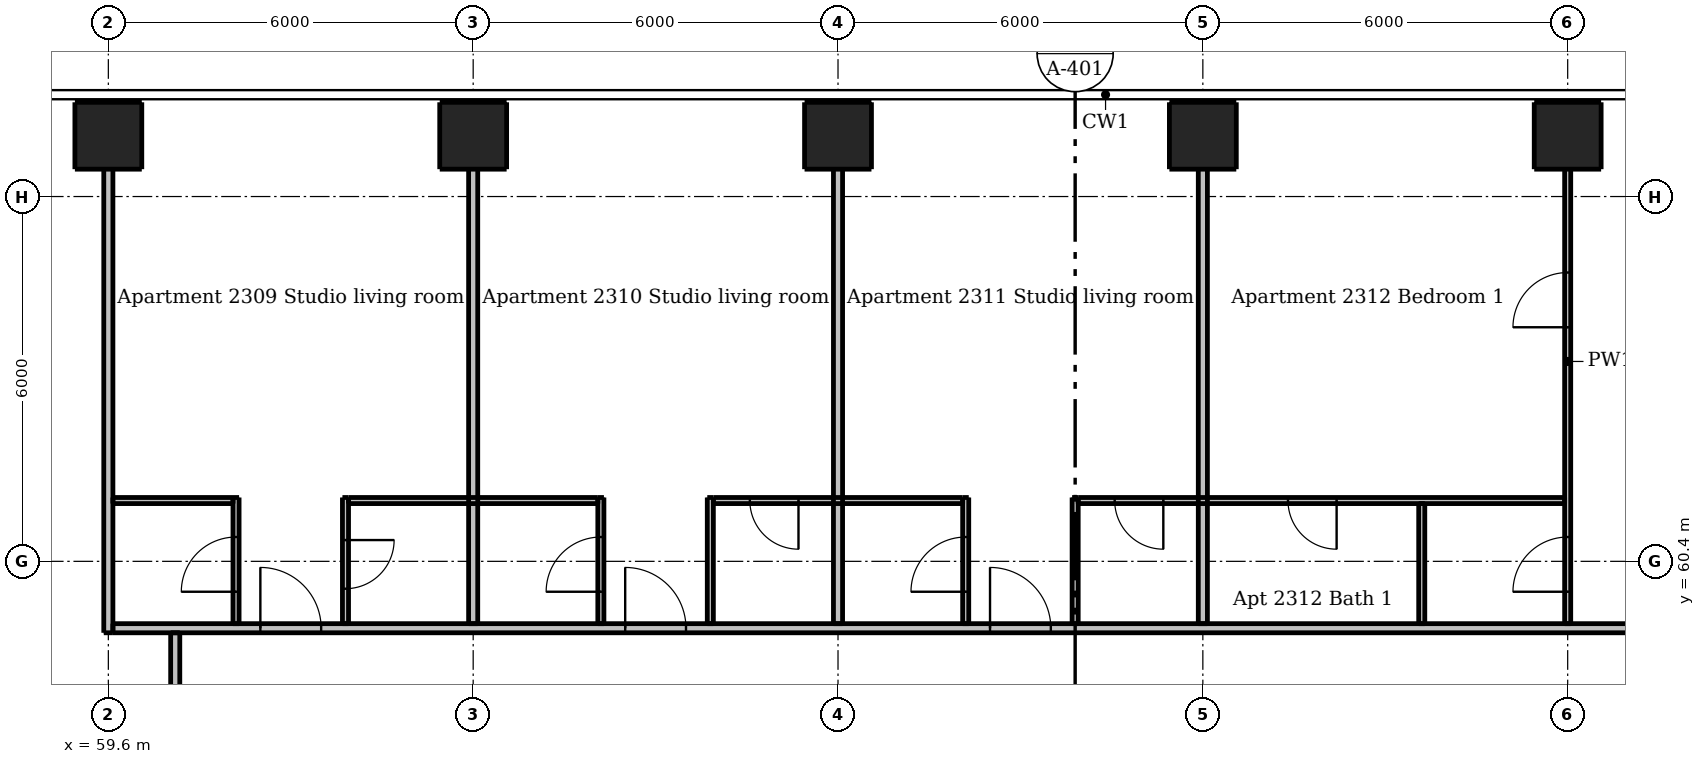
"""IFC4 building model, lengths in metres.
Left out: names, types, materials, properties, quantities, classifications, styles, units other than length and angle.
Written with IfcOpenShell. Run it as: python <this file> out.ifc"""

import sys

from ifc_helpers import new_model, si_unit, direction, frame, frame_2d, origin, origin_2d, place, context, subcontext, project, spatial, rectangle, extrude, element, fill, save


model = new_model("IFC4")
c1 = context("Model", 3, precision=1e-05, world=origin(), true_north=direction((0.0, 1.0)))
c2 = subcontext(c1, "Body", "Model", "MODEL_VIEW")
j1 = project(units=[si_unit("LENGTHUNIT", "METRE"), si_unit("PLANEANGLEUNIT", "RADIAN")], contexts=[c1])
p1 = place(None, origin())
s1 = spatial("IfcSite", under=j1, at=p1, CompositionType="ELEMENT")
p2 = place(p1, origin())
s2 = spatial("IfcBuilding", under=s1, at=p2, CompositionType="ELEMENT")
p3 = place(p2, frame((0.0, 0.0, 88.6)))
s3 = spatial("IfcBuildingStorey", under=s2, at=p3, CompositionType="ELEMENT", Elevation=88.6)
for number, where, z_axis, x_axis in (
    (1, (59.6, 67.4, 0.0), (0.0, 0.0, 1.0), (1.0, 0.0, 0.0)),
    (2, (65.6, 67.4, 0.0), (0.0, 0.0, 1.0), (1.0, 0.0, 0.0)),
    (3, (71.6, 67.4, 0.0), (0.0, 0.0, 1.0), (1.0, 0.0, 0.0)),
    (4, (77.6, 67.4, 0.0), (0.0, 0.0, 1.0), (1.0, 0.0, 0.0)),
    (5, (83.6, 67.4, 0.0), (0.0, 0.0, 1.0), (1.0, 0.0, 0.0)),
):
    element("IfcColumn", number, at=place(p3, frame(where, z_axis=z_axis, x_axis=x_axis)), inside=s3, PredefinedType="COLUMN", context=c2, shape_type="SweptSolid", body=[
        extrude(rectangle(XDim=1.1, YDim=1.1, at=origin_2d()), origin(), (0.0, 0.0, 1.0), 3.05),
    ])
p4 = place(p3, frame((61.7, 59.375, 0.0), z_axis=(0.0, 0.0, 1.0), x_axis=(0.0, 1.0, 0.0)))
e6 = element("IfcWall", 6, at=p4, inside=s3, PredefinedType="PARTITIONING", context=c2, shape_type="SweptSolid", body=[
    extrude(rectangle(XDim=2.075, YDim=0.1, at=frame_2d((1.038, 0.0))), origin(), (0.0, 0.0, 1.0), 3.05),
])
p5 = place(p4, frame((0.525, 0.0, 0.0)))
e7 = element("IfcOpeningElement", 7, at=p5, cuts=e6, PredefinedType="OPENING", context=c2, shape_type="SweptSolid", body=[
    extrude(rectangle(XDim=0.9, YDim=2.1, at=frame_2d((0.45, 1.05))), frame((0.0, 0.06, 0.0), z_axis=(0.0, -1.0, 0.0), x_axis=(1.0, 0.0, 0.0)), (0.0, 0.0, 1.0), 0.12),
])
p6 = place(p3, frame((63.5, 61.45, 0.0), z_axis=(0.0, 0.0, 1.0), x_axis=(0.0, -1.0, 0.0)))
e8 = element("IfcWall", 8, at=p6, inside=s3, PredefinedType="PARTITIONING", context=c2, shape_type="SweptSolid", body=[
    extrude(rectangle(XDim=2.075, YDim=0.1, at=frame_2d((1.038, 0.0))), origin(), (0.0, 0.0, 1.0), 3.05),
])
p7 = place(p6, frame((0.7, 0.0, 0.0)))
e9 = element("IfcOpeningElement", 9, at=p7, cuts=e8, PredefinedType="OPENING", context=c2, shape_type="SweptSolid", body=[
    extrude(rectangle(XDim=0.8, YDim=2.1, at=frame_2d((0.4, 1.05))), frame((0.0, 0.06, 0.0), z_axis=(0.0, -1.0, 0.0), x_axis=(1.0, 0.0, 0.0)), (0.0, 0.0, 1.0), 0.12),
])
p8 = place(p3, frame((67.7, 59.375, 0.0), z_axis=(0.0, 0.0, 1.0), x_axis=(0.0, 1.0, 0.0)))
e10 = element("IfcWall", 10, at=p8, inside=s3, PredefinedType="PARTITIONING", context=c2, shape_type="SweptSolid", body=[
    extrude(rectangle(XDim=2.075, YDim=0.1, at=frame_2d((1.038, 0.0))), origin(), (0.0, 0.0, 1.0), 3.05),
])
p9 = place(p8, frame((0.525, 0.0, 0.0)))
e11 = element("IfcOpeningElement", 11, at=p9, cuts=e10, PredefinedType="OPENING", context=c2, shape_type="SweptSolid", body=[
    extrude(rectangle(XDim=0.9, YDim=2.1, at=frame_2d((0.45, 1.05))), frame((0.0, 0.06, 0.0), z_axis=(0.0, -1.0, 0.0), x_axis=(1.0, 0.0, 0.0)), (0.0, 0.0, 1.0), 0.12),
])
p10 = place(p3, frame((69.5, 59.375, 0.0), z_axis=(0.0, 0.0, 1.0), x_axis=(0.0, 1.0, 0.0)))
e12 = element("IfcWall", 12, at=p10, inside=s3, PredefinedType="PARTITIONING", context=c2, shape_type="SweptSolid", body=[
    extrude(rectangle(XDim=2.075, YDim=0.1, at=frame_2d((1.038, 0.0))), origin(), (0.0, 0.0, 1.0), 3.05),
])
p11 = place(p3, frame((73.7, 59.375, 0.0), z_axis=(0.0, 0.0, 1.0), x_axis=(0.0, 1.0, 0.0)))
e13 = element("IfcWall", 13, at=p11, inside=s3, PredefinedType="PARTITIONING", context=c2, shape_type="SweptSolid", body=[
    extrude(rectangle(XDim=2.075, YDim=0.1, at=frame_2d((1.038, 0.0))), origin(), (0.0, 0.0, 1.0), 3.05),
])
p12 = place(p11, frame((0.525, 0.0, 0.0)))
e14 = element("IfcOpeningElement", 14, at=p12, cuts=e13, PredefinedType="OPENING", context=c2, shape_type="SweptSolid", body=[
    extrude(rectangle(XDim=0.9, YDim=2.1, at=frame_2d((0.45, 1.05))), frame((0.0, 0.06, 0.0), z_axis=(0.0, -1.0, 0.0), x_axis=(1.0, 0.0, 0.0)), (0.0, 0.0, 1.0), 0.12),
])
p13 = place(p3, frame((75.5, 59.375, 0.0), z_axis=(0.0, 0.0, 1.0), x_axis=(0.0, 1.0, 0.0)))
e15 = element("IfcWall", 15, at=p13, inside=s3, PredefinedType="PARTITIONING", context=c2, shape_type="SweptSolid", body=[
    extrude(rectangle(XDim=2.075, YDim=0.1, at=frame_2d((1.038, 0.0))), origin(), (0.0, 0.0, 1.0), 3.05),
])
p14 = place(p3, frame((81.2, 59.375, 0.0), z_axis=(0.0, 0.0, 1.0), x_axis=(0.0, 1.0, 0.0)))
e16 = element("IfcWall", 16, at=p14, inside=s3, PredefinedType="PARTITIONING", context=c2, shape_type="SweptSolid", body=[
    extrude(rectangle(XDim=1.975, YDim=0.1, at=frame_2d((0.988, 0.0))), origin(), (0.0, 0.0, 1.0), 3.05),
])
p15 = place(p3, frame((83.6, 59.375, 0.0), z_axis=(0.0, 0.0, 1.0), x_axis=(0.0, 1.0, 0.0)))
e17 = element("IfcWall", 17, at=p15, inside=s3, PredefinedType="PARTITIONING", context=c2, shape_type="SweptSolid", body=[
    extrude(rectangle(XDim=8.625, YDim=0.1, at=frame_2d((4.312, 0.0))), origin(), (0.0, 0.0, 1.0), 2.516),
])
p16 = place(p15, frame((0.525, 0.0, 0.0)))
e18 = element("IfcOpeningElement", 18, at=p16, cuts=e17, PredefinedType="OPENING", context=c2, shape_type="SweptSolid", body=[
    extrude(rectangle(XDim=0.9, YDim=2.1, at=frame_2d((0.45, 1.05))), frame((0.0, 0.06, 0.0), z_axis=(0.0, -1.0, 0.0), x_axis=(1.0, 0.0, 0.0)), (0.0, 0.0, 1.0), 0.12),
])
p17 = place(p15, frame((4.875, 0.0, 0.0)))
e19 = element("IfcOpeningElement", 19, at=p17, cuts=e17, PredefinedType="OPENING", context=c2, shape_type="SweptSolid", body=[
    extrude(rectangle(XDim=0.9, YDim=2.1, at=frame_2d((0.45, 1.05))), frame((0.0, 0.06, 0.0), z_axis=(0.0, -1.0, 0.0), x_axis=(1.0, 0.0, 0.0)), (0.0, 0.0, 1.0), 0.12),
])
p18 = place(p3, frame((59.675, 61.4, 0.0), z_axis=(0.0, 0.0, 1.0), x_axis=(1.0, 0.0, 0.0)))
e20 = element("IfcWall", 20, at=p18, inside=s3, PredefinedType="PARTITIONING", context=c2, shape_type="SweptSolid", body=[
    extrude(rectangle(XDim=1.975, YDim=0.1, at=frame_2d((0.987, 0.0))), origin(), (0.0, 0.0, 1.0), 3.05),
])
p19 = place(p3, frame((63.55, 61.4, 0.0), z_axis=(0.0, 0.0, 1.0), x_axis=(1.0, 0.0, 0.0)))
e21 = element("IfcWall", 21, at=p19, inside=s3, PredefinedType="PARTITIONING", context=c2, shape_type="SweptSolid", body=[
    extrude(rectangle(XDim=4.1, YDim=0.1, at=frame_2d((2.05, 0.0))), origin(), (0.0, 0.0, 1.0), 3.05),
])
p20 = place(p3, frame((73.65, 61.4, 0.0), z_axis=(0.0, 0.0, 1.0), x_axis=(-1.0, 0.0, 0.0)))
e22 = element("IfcWall", 22, at=p20, inside=s3, PredefinedType="PARTITIONING", context=c2, shape_type="SweptSolid", body=[
    extrude(rectangle(XDim=4.1, YDim=0.1, at=frame_2d((2.05, 0.0))), origin(), (0.0, 0.0, 1.0), 3.05),
])
p21 = place(p20, frame((2.7, 0.0, 0.0)))
e23 = element("IfcOpeningElement", 23, at=p21, cuts=e22, PredefinedType="OPENING", context=c2, shape_type="SweptSolid", body=[
    extrude(rectangle(XDim=0.8, YDim=2.1, at=frame_2d((0.4, 1.05))), frame((0.0, 0.06, 0.0), z_axis=(0.0, -1.0, 0.0), x_axis=(1.0, 0.0, 0.0)), (0.0, 0.0, 1.0), 0.12),
])
p22 = place(p3, frame((83.55, 61.4, 0.0), z_axis=(0.0, 0.0, 1.0), x_axis=(-1.0, 0.0, 0.0)))
e24 = element("IfcWall", 24, at=p22, inside=s3, PredefinedType="PARTITIONING", context=c2, shape_type="SweptSolid", body=[
    extrude(rectangle(XDim=8.0, YDim=0.1, at=frame_2d((4.0, 0.0))), origin(), (0.0, 0.0, 1.0), 3.05),
])
p23 = place(p22, frame((6.6, 0.0, 0.0)))
e25 = element("IfcOpeningElement", 25, at=p23, cuts=e24, PredefinedType="OPENING", context=c2, shape_type="SweptSolid", body=[
    extrude(rectangle(XDim=0.8, YDim=2.1, at=frame_2d((0.4, 1.05))), frame((0.0, 0.06, 0.0), z_axis=(0.0, -1.0, 0.0), x_axis=(1.0, 0.0, 0.0)), (0.0, 0.0, 1.0), 0.12),
])
p24 = place(p22, frame((3.75, 0.0, 0.0)))
e26 = element("IfcOpeningElement", 26, at=p24, cuts=e24, PredefinedType="OPENING", context=c2, shape_type="SweptSolid", body=[
    extrude(rectangle(XDim=0.8, YDim=2.1, at=frame_2d((0.4, 1.05))), frame((0.0, 0.06, 0.0), z_axis=(0.0, -1.0, 0.0), x_axis=(1.0, 0.0, 0.0)), (0.0, 0.0, 1.0), 0.12),
])
p25 = place(p3, frame((59.6, 59.225, 0.0), z_axis=(0.0, 0.0, 1.0), x_axis=(0.0, 1.0, 0.0)))
e27 = element("IfcWall", 27, at=p25, inside=s3, PredefinedType="PARTITIONING", context=c2, shape_type="SweptSolid", body=[
    extrude(rectangle(XDim=8.775, YDim=0.15, at=frame_2d((4.387, 0.0))), origin(), (0.0, 0.0, 1.0), 2.51),
])
p26 = place(p3, frame((60.7, 30.325, 0.0), z_axis=(0.0, 0.0, 1.0), x_axis=(0.0, 1.0, 0.0)))
e28 = element("IfcWall", 28, at=p26, inside=s3, PredefinedType="PARTITIONING", context=c2, shape_type="SweptSolid", body=[
    extrude(rectangle(XDim=28.9, YDim=0.15, at=frame_2d((14.45, 0.0))), origin(), (0.0, 0.0, 1.0), 3.05),
])
p27 = place(p26, frame((2.575, 0.0, 0.0)))
e29 = element("IfcOpeningElement", 29, at=p27, cuts=e28, PredefinedType="OPENING", context=c2, shape_type="SweptSolid", body=[
    extrude(rectangle(XDim=1.0, YDim=2.1, at=frame_2d((0.5, 1.05))), frame((0.0, 0.085, 0.0), z_axis=(0.0, -1.0, 0.0), x_axis=(1.0, 0.0, 0.0)), (0.0, 0.0, 1.0), 0.17),
])
p28 = place(p26, frame((8.575, 0.0, 0.0)))
e30 = element("IfcOpeningElement", 30, at=p28, cuts=e28, PredefinedType="OPENING", context=c2, shape_type="SweptSolid", body=[
    extrude(rectangle(XDim=1.0, YDim=2.1, at=frame_2d((0.5, 1.05))), frame((0.0, 0.085, 0.0), z_axis=(0.0, -1.0, 0.0), x_axis=(1.0, 0.0, 0.0)), (0.0, 0.0, 1.0), 0.17),
])
p29 = place(p26, frame((14.575, 0.0, 0.0)))
e31 = element("IfcOpeningElement", 31, at=p29, cuts=e28, PredefinedType="OPENING", context=c2, shape_type="SweptSolid", body=[
    extrude(rectangle(XDim=1.0, YDim=2.1, at=frame_2d((0.5, 1.05))), frame((0.0, 0.085, 0.0), z_axis=(0.0, -1.0, 0.0), x_axis=(1.0, 0.0, 0.0)), (0.0, 0.0, 1.0), 0.17),
])
p30 = place(p26, frame((26.025, 0.0, 0.0)))
e32 = element("IfcOpeningElement", 32, at=p30, cuts=e28, PredefinedType="OPENING", context=c2, shape_type="SweptSolid", body=[
    extrude(rectangle(XDim=1.0, YDim=2.1, at=frame_2d((0.5, 1.05))), frame((0.0, 0.085, 0.0), z_axis=(0.0, -1.0, 0.0), x_axis=(1.0, 0.0, 0.0)), (0.0, 0.0, 1.0), 0.17),
])
for number, where, z_axis, x_axis in (
    (33, (65.6, 59.375, 0.0), (0.0, 0.0, 1.0), (0.0, 1.0, 0.0)),
    (34, (71.6, 59.375, 0.0), (0.0, 0.0, 1.0), (0.0, 1.0, 0.0)),
    (35, (77.6, 59.375, 0.0), (0.0, 0.0, 1.0), (0.0, 1.0, 0.0)),
):
    element("IfcWall", number, at=place(p3, frame(where, z_axis=z_axis, x_axis=x_axis)), inside=s3, PredefinedType="PARTITIONING", context=c2, shape_type="SweptSolid", body=[
        extrude(rectangle(XDim=8.625, YDim=0.15, at=frame_2d((4.312, 0.0))), origin(), (0.0, 0.0, 1.0), 2.516),
    ])
p31 = place(p3, frame((59.675, 59.3, 0.0), z_axis=(0.0, 0.0, 1.0), x_axis=(1.0, 0.0, 0.0)))
e36 = element("IfcWall", 36, at=p31, inside=s3, PredefinedType="PARTITIONING", context=c2, shape_type="SweptSolid", body=[
    extrude(rectangle(XDim=28.55, YDim=0.15, at=frame_2d((14.275, 0.0))), origin(), (0.0, 0.0, 1.0), 3.05),
])
p32 = place(p31, frame((2.425, 0.0, 0.0)))
e37 = element("IfcOpeningElement", 37, at=p32, cuts=e36, PredefinedType="OPENING", context=c2, shape_type="SweptSolid", body=[
    extrude(rectangle(XDim=1.0, YDim=2.1, at=frame_2d((0.5, 1.05))), frame((0.0, 0.085, 0.0), z_axis=(0.0, -1.0, 0.0), x_axis=(1.0, 0.0, 0.0)), (0.0, 0.0, 1.0), 0.17),
])
p33 = place(p31, frame((8.425, 0.0, 0.0)))
e38 = element("IfcOpeningElement", 38, at=p33, cuts=e36, PredefinedType="OPENING", context=c2, shape_type="SweptSolid", body=[
    extrude(rectangle(XDim=1.0, YDim=2.1, at=frame_2d((0.5, 1.05))), frame((0.0, 0.085, 0.0), z_axis=(0.0, -1.0, 0.0), x_axis=(1.0, 0.0, 0.0)), (0.0, 0.0, 1.0), 0.17),
])
p34 = place(p31, frame((14.425, 0.0, 0.0)))
e39 = element("IfcOpeningElement", 39, at=p34, cuts=e36, PredefinedType="OPENING", context=c2, shape_type="SweptSolid", body=[
    extrude(rectangle(XDim=1.0, YDim=2.1, at=frame_2d((0.5, 1.05))), frame((0.0, 0.085, 0.0), z_axis=(0.0, -1.0, 0.0), x_axis=(1.0, 0.0, 0.0)), (0.0, 0.0, 1.0), 0.17),
])
p35 = place(p31, frame((25.775, 0.0, 0.0)))
e40 = element("IfcOpeningElement", 40, at=p35, cuts=e36, PredefinedType="OPENING", context=c2, shape_type="SweptSolid", body=[
    extrude(rectangle(XDim=1.0, YDim=2.1, at=frame_2d((0.5, 1.05))), frame((0.0, 0.085, 0.0), z_axis=(0.0, -1.0, 0.0), x_axis=(1.0, 0.0, 0.0)), (0.0, 0.0, 1.0), 0.17),
])
p36 = place(p32, origin())
e41 = element("IfcDoor", 41, at=p36, inside=s3, OperationType="SINGLE_SWING_LEFT", PredefinedType="DOOR", context=c2, shape_type="SweptSolid", body=[
    extrude(rectangle(XDim=1.0, YDim=2.1, at=frame_2d((0.5, 1.05))), frame((0.0, 0.025, 0.0), z_axis=(0.0, -1.0, 0.0), x_axis=(1.0, 0.0, 0.0)), (0.0, 0.0, 1.0), 0.05),
])
fill(e37, e41)
p37 = place(p5, origin())
e42 = element("IfcDoor", 42, at=p37, inside=s3, OperationType="SINGLE_SWING_LEFT", PredefinedType="DOOR", context=c2, shape_type="SweptSolid", body=[
    extrude(rectangle(XDim=0.9, YDim=2.1, at=frame_2d((0.45, 1.05))), frame((0.0, 0.025, 0.0), z_axis=(0.0, -1.0, 0.0), x_axis=(1.0, 0.0, 0.0)), (0.0, 0.0, 1.0), 0.05),
])
fill(e7, e42)
p38 = place(p7, origin())
e43 = element("IfcDoor", 43, at=p38, inside=s3, OperationType="SINGLE_SWING_LEFT", PredefinedType="DOOR", context=c2, shape_type="SweptSolid", body=[
    extrude(rectangle(XDim=0.8, YDim=2.1, at=frame_2d((0.4, 1.05))), frame((0.0, 0.025, 0.0), z_axis=(0.0, -1.0, 0.0), x_axis=(1.0, 0.0, 0.0)), (0.0, 0.0, 1.0), 0.05),
])
fill(e9, e43)
p39 = place(p33, origin())
e44 = element("IfcDoor", 44, at=p39, inside=s3, OperationType="SINGLE_SWING_LEFT", PredefinedType="DOOR", context=c2, shape_type="SweptSolid", body=[
    extrude(rectangle(XDim=1.0, YDim=2.1, at=frame_2d((0.5, 1.05))), frame((0.0, 0.025, 0.0), z_axis=(0.0, -1.0, 0.0), x_axis=(1.0, 0.0, 0.0)), (0.0, 0.0, 1.0), 0.05),
])
fill(e38, e44)
p40 = place(p9, origin())
e45 = element("IfcDoor", 45, at=p40, inside=s3, OperationType="SINGLE_SWING_LEFT", PredefinedType="DOOR", context=c2, shape_type="SweptSolid", body=[
    extrude(rectangle(XDim=0.9, YDim=2.1, at=frame_2d((0.45, 1.05))), frame((0.0, 0.025, 0.0), z_axis=(0.0, -1.0, 0.0), x_axis=(1.0, 0.0, 0.0)), (0.0, 0.0, 1.0), 0.05),
])
fill(e11, e45)
p41 = place(p21, origin())
e46 = element("IfcDoor", 46, at=p41, inside=s3, OperationType="SINGLE_SWING_LEFT", PredefinedType="DOOR", context=c2, shape_type="SweptSolid", body=[
    extrude(rectangle(XDim=0.8, YDim=2.1, at=frame_2d((0.4, 1.05))), frame((0.0, 0.025, 0.0), z_axis=(0.0, -1.0, 0.0), x_axis=(1.0, 0.0, 0.0)), (0.0, 0.0, 1.0), 0.05),
])
fill(e23, e46)
p42 = place(p34, origin())
e47 = element("IfcDoor", 47, at=p42, inside=s3, OperationType="SINGLE_SWING_LEFT", PredefinedType="DOOR", context=c2, shape_type="SweptSolid", body=[
    extrude(rectangle(XDim=1.0, YDim=2.1, at=frame_2d((0.5, 1.05))), frame((0.0, 0.025, 0.0), z_axis=(0.0, -1.0, 0.0), x_axis=(1.0, 0.0, 0.0)), (0.0, 0.0, 1.0), 0.05),
])
fill(e39, e47)
p43 = place(p12, origin())
e48 = element("IfcDoor", 48, at=p43, inside=s3, OperationType="SINGLE_SWING_LEFT", PredefinedType="DOOR", context=c2, shape_type="SweptSolid", body=[
    extrude(rectangle(XDim=0.9, YDim=2.1, at=frame_2d((0.45, 1.05))), frame((0.0, 0.025, 0.0), z_axis=(0.0, -1.0, 0.0), x_axis=(1.0, 0.0, 0.0)), (0.0, 0.0, 1.0), 0.05),
])
fill(e14, e48)
p44 = place(p23, origin())
e49 = element("IfcDoor", 49, at=p44, inside=s3, OperationType="SINGLE_SWING_LEFT", PredefinedType="DOOR", context=c2, shape_type="SweptSolid", body=[
    extrude(rectangle(XDim=0.8, YDim=2.1, at=frame_2d((0.4, 1.05))), frame((0.0, 0.025, 0.0), z_axis=(0.0, -1.0, 0.0), x_axis=(1.0, 0.0, 0.0)), (0.0, 0.0, 1.0), 0.05),
])
fill(e25, e49)
p45 = place(p16, origin())
e50 = element("IfcDoor", 50, at=p45, inside=s3, OperationType="SINGLE_SWING_LEFT", PredefinedType="DOOR", context=c2, shape_type="SweptSolid", body=[
    extrude(rectangle(XDim=0.9, YDim=2.1, at=frame_2d((0.45, 1.05))), frame((0.0, 0.025, 0.0), z_axis=(0.0, -1.0, 0.0), x_axis=(1.0, 0.0, 0.0)), (0.0, 0.0, 1.0), 0.05),
])
fill(e18, e50)
p46 = place(p17, origin())
e51 = element("IfcDoor", 51, at=p46, inside=s3, OperationType="SINGLE_SWING_LEFT", PredefinedType="DOOR", context=c2, shape_type="SweptSolid", body=[
    extrude(rectangle(XDim=0.9, YDim=2.1, at=frame_2d((0.45, 1.05))), frame((0.0, 0.025, 0.0), z_axis=(0.0, -1.0, 0.0), x_axis=(1.0, 0.0, 0.0)), (0.0, 0.0, 1.0), 0.05),
])
fill(e19, e51)
p47 = place(p24, origin())
e52 = element("IfcDoor", 52, at=p47, inside=s3, OperationType="SINGLE_SWING_LEFT", PredefinedType="DOOR", context=c2, shape_type="SweptSolid", body=[
    extrude(rectangle(XDim=0.8, YDim=2.1, at=frame_2d((0.4, 1.05))), frame((0.0, 0.025, 0.0), z_axis=(0.0, -1.0, 0.0), x_axis=(1.0, 0.0, 0.0)), (0.0, 0.0, 1.0), 0.05),
])
fill(e26, e52)
save(model, sys.argv[1])
